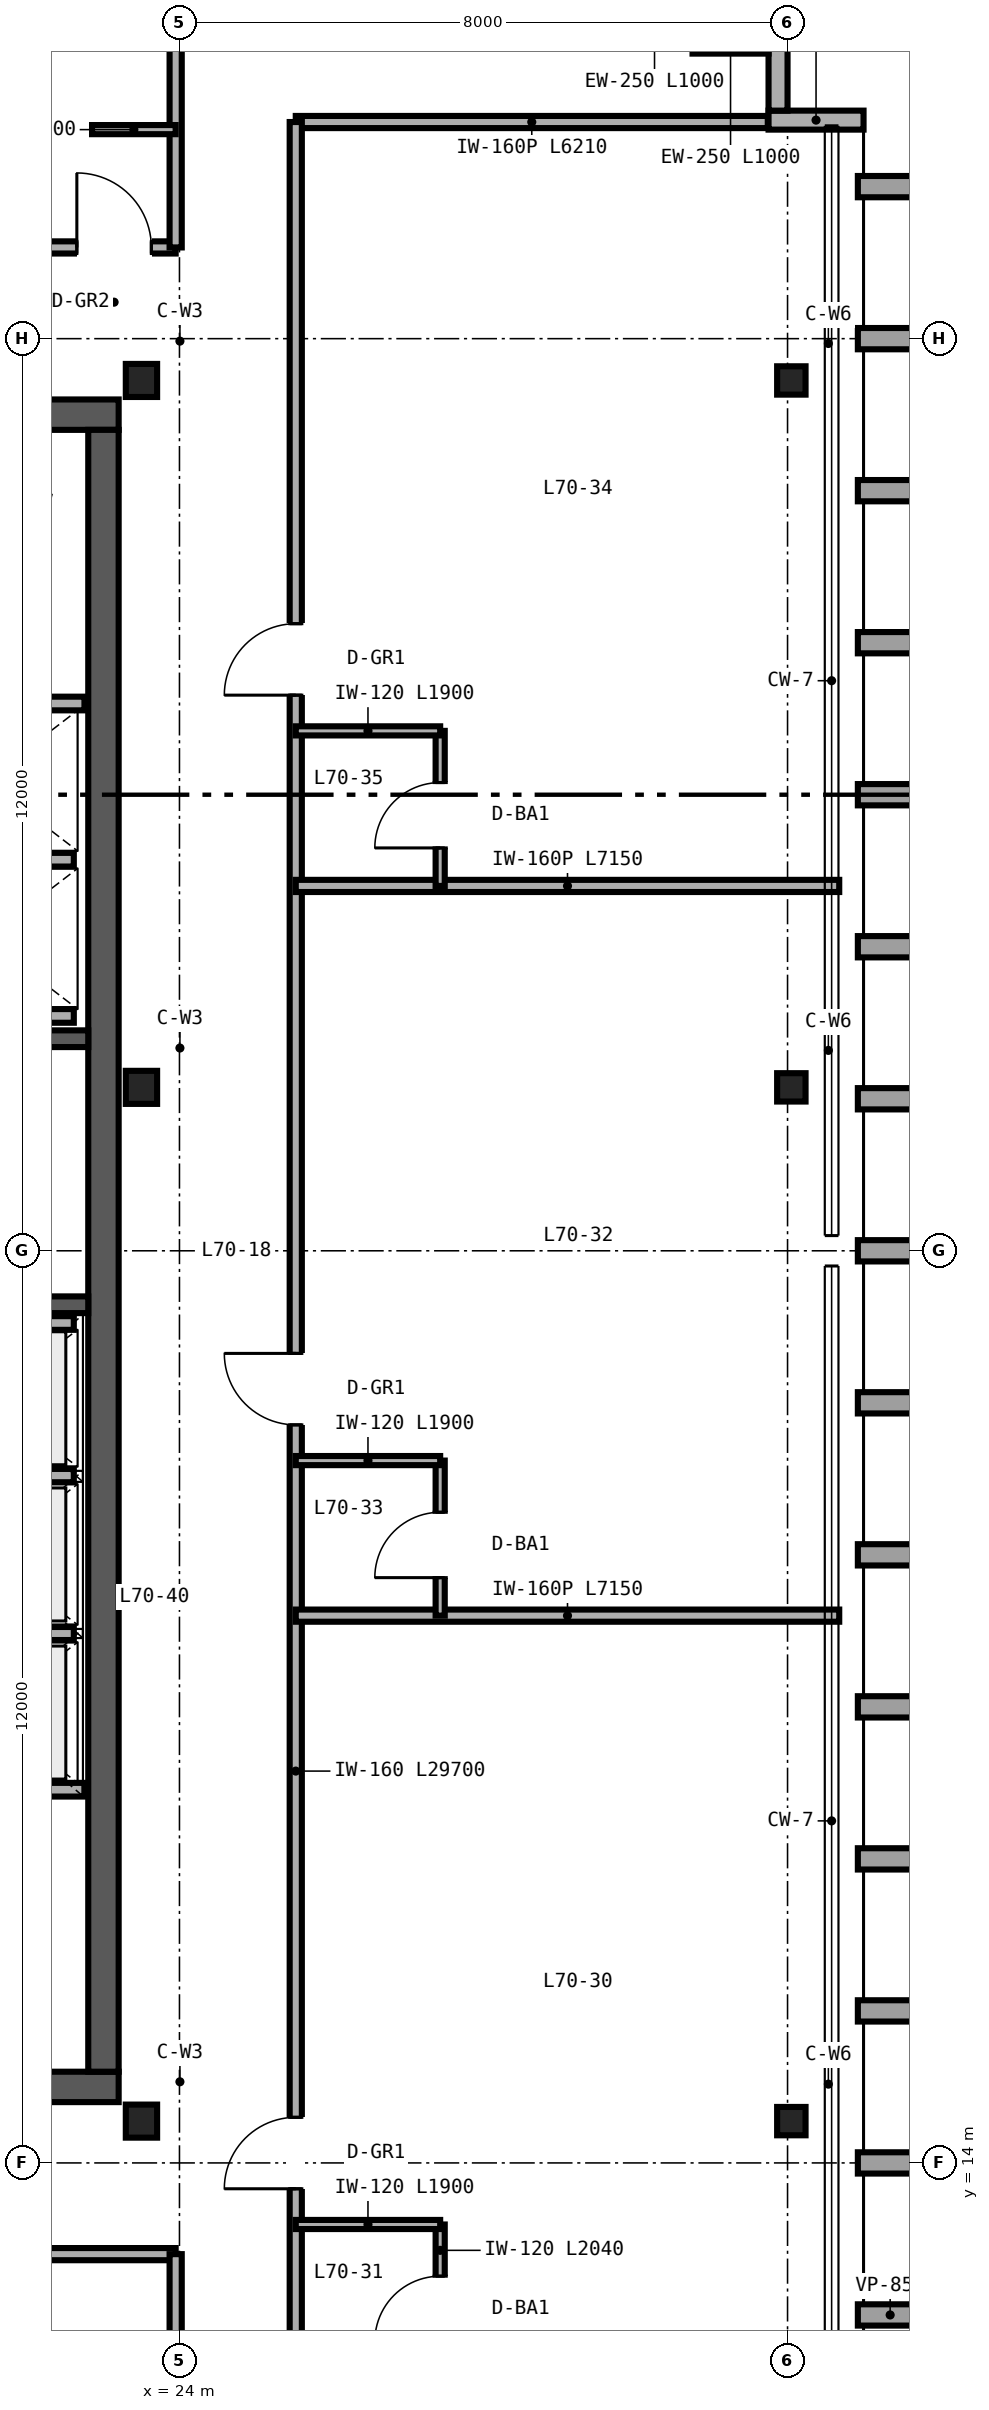
"""IFC4 building model, lengths in metres.
Left out: names, types, materials, properties, quantities, classifications, styles, units other than length and angle.
Written with IfcOpenShell. Run it as: python <this file> out.ifc"""

import sys

from ifc_helpers import new_model, si_unit, direction, frame, frame_2d, origin, origin_2d, place, context, subcontext, project, spatial, rectangle, i_section, extrude, source, transform, mapped, element, fill, save


model = new_model("IFC4")
c1 = context("Model", 3, precision=1e-05, world=origin(), true_north=direction((0.0, 1.0)))
c2 = subcontext(c1, "Body", "Model", "MODEL_VIEW")
j1 = project(units=[si_unit("LENGTHUNIT", "METRE"), si_unit("PLANEANGLEUNIT", "RADIAN")], contexts=[c1])
p1 = place(None, origin())
s1 = spatial("IfcSite", under=j1, at=p1, CompositionType="ELEMENT")
p2 = place(p1, origin())
s2 = spatial("IfcBuilding", under=s1, at=p2, CompositionType="ELEMENT")
p3 = place(p2, frame((0.0, 0.0, 276.0)))
s3 = spatial("IfcBuildingStorey", under=s2, at=p3, CompositionType="ELEMENT", Elevation=276.0)
p4 = place(p3, frame((10.8, 15.0, 0.0), z_axis=(0.0, 0.0, 1.0), x_axis=(1.0, 0.0, 0.0)))
e1 = element("IfcWall", 1, at=p4, inside=s3, PredefinedType="SHEAR", context=c2, shape_type="SweptSolid", body=[
    extrude(rectangle(XDim=12.4, YDim=0.4, at=frame_2d((6.2, 0.0))), origin(), (0.0, 0.0, 1.0), 3.38),
])
p5 = place(p4, frame((10.1, 0.0, 0.0)))
e2 = element("IfcOpeningElement", 2, at=p5, cuts=e1, PredefinedType="OPENING", context=c2, shape_type="SweptSolid", body=[
    extrude(rectangle(XDim=1.0, YDim=2.15, at=frame_2d((0.5, 1.075))), frame((0.0, 0.21, 0.0), z_axis=(0.0, -1.0, 0.0), x_axis=(1.0, 0.0, 0.0)), (0.0, 0.0, 1.0), 0.42),
])
p6 = place(p3, frame((10.8, 37.0, 0.0), z_axis=(0.0, 0.0, 1.0), x_axis=(1.0, 0.0, 0.0)))
e3 = element("IfcWall", 3, at=p6, inside=s3, PredefinedType="SHEAR", context=c2, shape_type="SweptSolid", body=[
    extrude(rectangle(XDim=12.4, YDim=0.4, at=frame_2d((6.2, 0.0))), origin(), (0.0, 0.0, 1.0), 3.38),
])
p7 = place(p6, frame((8.78, 0.0, 0.0)))
e4 = element("IfcOpeningElement", 4, at=p7, cuts=e3, PredefinedType="OPENING", context=c2, shape_type="SweptSolid", body=[
    extrude(rectangle(XDim=1.0, YDim=2.15, at=frame_2d((0.5, 1.075))), frame((0.0, 0.21, 0.0), z_axis=(0.0, -1.0, 0.0), x_axis=(1.0, 0.0, 0.0)), (0.0, 0.0, 1.0), 0.42),
])
p8 = place(p3, frame((23.0, 15.2, 0.0), z_axis=(0.0, 0.0, 1.0), x_axis=(0.0, 1.0, 0.0)))
e5 = element("IfcWall", 5, at=p8, inside=s3, PredefinedType="SHEAR", context=c2, shape_type="SweptSolid", body=[
    extrude(rectangle(XDim=21.6, YDim=0.4, at=frame_2d((10.8, 0.0))), origin(), (0.0, 0.0, 1.0), 3.38),
])
p9 = place(p3, frame((14.18, 25.29, 0.0), z_axis=(0.0, 0.0, 1.0), x_axis=(1.0, 0.0, 0.0)))
e6 = element("IfcWall", 6, at=p9, inside=s3, PredefinedType="SHEAR", context=c2, shape_type="SweptSolid", body=[
    extrude(rectangle(XDim=8.62, YDim=0.22, at=frame_2d((4.31, 0.0))), origin(), (0.0, 0.0, 1.0), 3.4),
])
p10 = place(p9, frame((0.47, 0.0, 0.0)))
e7 = element("IfcOpeningElement", 7, at=p10, cuts=e6, PredefinedType="OPENING", context=c2, shape_type="SweptSolid", body=[
    extrude(rectangle(XDim=1.05, YDim=2.15, at=frame_2d((0.525, 1.075))), frame((0.0, 0.12, 0.0), z_axis=(0.0, -1.0, 0.0), x_axis=(1.0, 0.0, 0.0)), (0.0, 0.0, 1.0), 0.24),
])
p11 = place(p3, frame((14.18, 28.79, 0.0), z_axis=(0.0, 0.0, 1.0), x_axis=(1.0, 0.0, 0.0)))
e8 = element("IfcWall", 8, at=p11, inside=s3, PredefinedType="SHEAR", context=c2, shape_type="SweptSolid", body=[
    extrude(rectangle(XDim=8.62, YDim=0.22, at=frame_2d((4.31, 0.0))), origin(), (0.0, 0.0, 1.0), 3.4),
])
m1 = source(origin(), c2, "Body", "SweptSolid", [
    extrude(i_section(OverallWidth=0.412, OverallDepth=0.435, WebThickness=0.036, FlangeThickness=0.057, FilletRadius=0.025, at=origin_2d()), origin(), (0.0, 0.0, 1.0), 3.38),
])
for number, where, z_axis, x_axis in (
    (9, (23.5, 14.55, 0.0), (0.0, 0.0, 1.0), (1.0, 0.0, 0.0)),
    (10, (23.5, 28.15, 0.0), (0.0, 0.0, 1.0), (1.0, 0.0, 0.0)),
    (11, (23.5, 37.45, 0.0), (0.0, 0.0, 1.0), (1.0, 0.0, 0.0)),
):
    element("IfcColumn", number, at=place(p3, frame(where, z_axis=z_axis, x_axis=x_axis)), inside=s3, PredefinedType="COLUMN", context=c2, shape_type="MappedRepresentation", body=[
        mapped(m1, transform((0.0, 0.0, 0.0), scale=1.0)),
    ])
m2 = source(origin(), c2, "Body", "SweptSolid", [
    extrude(i_section(OverallWidth=0.374, OverallDepth=0.373, WebThickness=0.016, FlangeThickness=0.026, FilletRadius=0.025, at=origin_2d()), origin(), (0.0, 0.0, 1.0), 3.38),
])
for number, where, z_axis, x_axis in (
    (12, (32.05, 14.55, 0.0), (0.0, 0.0, 1.0), (1.0, 0.0, 0.0)),
    (13, (32.05, 28.15, 0.0), (0.0, 0.0, 1.0), (1.0, 0.0, 0.0)),
    (14, (32.05, 37.45, 0.0), (0.0, 0.0, 1.0), (1.0, 0.0, 0.0)),
):
    element("IfcColumn", number, at=place(p3, frame(where, z_axis=z_axis, x_axis=x_axis)), inside=s3, PredefinedType="COLUMN", context=c2, shape_type="MappedRepresentation", body=[
        mapped(m2, transform((0.0, 0.0, 0.0), scale=1.0)),
    ])
p12 = place(p3, frame((33.0, 40.875, 0.0), z_axis=(0.0, 0.0, 1.0), x_axis=(-1.0, 0.0, 0.0)))
e15 = element("IfcWall", 15, at=p12, inside=s3, PredefinedType="SOLIDWALL", context=c2, shape_type="SweptSolid", body=[
    extrude(rectangle(XDim=1.25, YDim=0.25, at=frame_2d((0.625, 0.0))), origin(), (0.0, 0.0, 1.0), 3.38),
])
for number, where, z_axis, x_axis in (
    (16, (31.875, 41.0, 0.0), (0.0, 0.0, 1.0), (0.0, 1.0, 0.0)),
    (17, (31.75, 41.875, 0.0), (0.0, 0.0, 1.0), (-1.0, 0.0, 0.0)),
):
    element("IfcWall", number, at=place(p3, frame(where, z_axis=z_axis, x_axis=x_axis)), inside=s3, PredefinedType="SOLIDWALL", context=c2, shape_type="SweptSolid", body=[
        extrude(rectangle(XDim=1.0, YDim=0.25, at=frame_2d((0.5, 0.0))), origin(), (0.0, 0.0, 1.0), 3.38),
    ])
p13 = place(p3, frame((20.12, 18.91, 0.0), z_axis=(0.0, 0.0, 1.0), x_axis=(1.0, 0.0, 0.0)))
e18 = element("IfcWall", 18, at=p13, inside=s3, PredefinedType="SOLIDWALL", context=c2, shape_type="SweptSolid", body=[
    extrude(rectangle(XDim=2.63, YDim=0.18, at=frame_2d((1.315, 0.0))), origin(), (0.0, 0.0, 1.0), 3.38),
])
p14 = place(p3, frame((20.25, 25.05, 0.0), z_axis=(0.0, 0.0, 1.0), x_axis=(1.0, 0.0, 0.0)))
e19 = element("IfcWall", 19, at=p14, inside=s3, PredefinedType="SOLIDWALL", context=c2, shape_type="SweptSolid", body=[
    extrude(rectangle(XDim=2.36, YDim=0.18, at=frame_2d((1.18, 0.0))), origin(), (0.0, 0.0, 1.0), 3.38),
])
p15 = place(p3, frame((20.25, 20.965, 0.0), z_axis=(0.0, 0.0, 1.0), x_axis=(1.0, 0.0, 0.0)))
e20 = element("IfcWall", 20, at=p15, inside=s3, PredefinedType="SOLIDWALL", context=c2, shape_type="SweptSolid", body=[
    extrude(rectangle(XDim=2.36, YDim=0.18, at=frame_2d((1.18, 0.0))), origin(), (0.0, 0.0, 1.0), 2.48),
])
for number, where, z_axis, x_axis in (
    (21, (20.25, 23.045, 0.0), (0.0, 0.0, 1.0), (1.0, 0.0, 0.0)),
    (22, (20.25, 29.09, 0.0), (0.0, 0.0, 1.0), (1.0, 0.0, 0.0)),
):
    element("IfcWall", number, at=place(p3, frame(where, z_axis=z_axis, x_axis=x_axis)), inside=s3, PredefinedType="SOLIDWALL", context=c2, shape_type="SweptSolid", body=[
        extrude(rectangle(XDim=2.36, YDim=0.18, at=frame_2d((1.18, 0.0))), origin(), (0.0, 0.0, 1.0), 3.38),
    ])
p16 = place(p3, frame((20.25, 33.2, 0.0), z_axis=(0.0, 0.0, 1.0), x_axis=(1.0, 0.0, 0.0)))
e23 = element("IfcWall", 23, at=p16, inside=s3, PredefinedType="SOLIDWALL", context=c2, shape_type="SweptSolid", body=[
    extrude(rectangle(XDim=2.5, YDim=0.18, at=frame_2d((1.25, 0.0))), origin(), (0.0, 0.0, 1.0), 3.38),
])
p17 = place(p3, frame((20.25, 31.145, 0.0), z_axis=(0.0, 0.0, 1.0), x_axis=(1.0, 0.0, 0.0)))
e24 = element("IfcWall", 24, at=p17, inside=s3, PredefinedType="SOLIDWALL", context=c2, shape_type="SweptSolid", body=[
    extrude(rectangle(XDim=2.36, YDim=0.18, at=frame_2d((1.18, 0.0))), origin(), (0.0, 0.0, 1.0), 3.38),
])
p18 = place(p3, frame((11.2, 12.8, 0.0), z_axis=(0.0, 0.0, 1.0), x_axis=(1.0, 0.0, 0.0)))
e25 = element("IfcWall", 25, at=p18, inside=s3, PredefinedType="PARTITIONING", context=c2, shape_type="SweptSolid", body=[
    extrude(rectangle(XDim=12.75, YDim=0.16, at=frame_2d((6.375, 0.0))), origin(), (0.0, 0.0, 1.0), 3.38),
])
p19 = place(p18, frame((5.7, 0.0, 0.0)))
e26 = element("IfcOpeningElement", 26, at=p19, cuts=e25, PredefinedType="OPENING", context=c2, shape_type="SweptSolid", body=[
    extrude(rectangle(XDim=0.98, YDim=2.2, at=frame_2d((0.49, 1.1))), frame((0.0, 0.09, 0.0), z_axis=(0.0, -1.0, 0.0), x_axis=(1.0, 0.0, 0.0)), (0.0, 0.0, 1.0), 0.18),
])
p20 = place(p18, frame((9.395, 0.0, 0.0)))
e27 = element("IfcOpeningElement", 27, at=p20, cuts=e25, PredefinedType="OPENING", context=c2, shape_type="SweptSolid", body=[
    extrude(rectangle(XDim=0.96, YDim=2.15, at=frame_2d((0.48, 1.075))), frame((0.0, 0.09, 0.0), z_axis=(0.0, -1.0, 0.0), x_axis=(1.0, 0.0, 0.0)), (0.0, 0.0, 1.0), 0.18),
])
p21 = place(p3, frame((23.95, 8.36, 0.0), z_axis=(0.0, 0.0, 1.0), x_axis=(0.0, 1.0, 0.0)))
e28 = element("IfcWall", 28, at=p21, inside=s3, PredefinedType="PARTITIONING", context=c2, shape_type="SweptSolid", body=[
    extrude(rectangle(XDim=4.44, YDim=0.16, at=frame_2d((2.22, 0.0))), origin(), (0.0, 0.0, 1.0), 3.38),
])
p22 = place(p3, frame((11.2, 39.2, 0.0), z_axis=(0.0, 0.0, 1.0), x_axis=(1.0, 0.0, 0.0)))
e29 = element("IfcWall", 29, at=p22, inside=s3, PredefinedType="PARTITIONING", context=c2, shape_type="SweptSolid", body=[
    extrude(rectangle(XDim=12.75, YDim=0.16, at=frame_2d((6.375, 0.0))), origin(), (0.0, 0.0, 1.0), 3.38),
])
p23 = place(p22, frame((11.45, 0.0, 0.0)))
e30 = element("IfcOpeningElement", 30, at=p23, cuts=e29, PredefinedType="OPENING", context=c2, shape_type="SweptSolid", body=[
    extrude(rectangle(XDim=0.98, YDim=2.2, at=frame_2d((0.49, 1.1))), frame((0.0, 0.09, 0.0), z_axis=(0.0, -1.0, 0.0), x_axis=(1.0, 0.0, 0.0)), (0.0, 0.0, 1.0), 0.18),
])
p24 = place(p3, frame((23.95, 39.2, 0.0), z_axis=(0.0, 0.0, 1.0), x_axis=(0.0, 1.0, 0.0)))
e31 = element("IfcWall", 31, at=p24, inside=s3, PredefinedType="PARTITIONING", context=c2, shape_type="SweptSolid", body=[
    extrude(rectangle(XDim=4.44, YDim=0.16, at=frame_2d((2.22, 0.0))), origin(), (0.0, 0.0, 1.0), 3.38),
])
p25 = place(p3, frame((22.85, 40.75, 0.0), z_axis=(0.0, 0.0, 1.0), x_axis=(1.0, 0.0, 0.0)))
e32 = element("IfcWall", 32, at=p25, inside=s3, PredefinedType="PARTITIONING", context=c2, shape_type="SweptSolid", body=[
    extrude(rectangle(XDim=1.1, YDim=0.12, at=frame_2d((0.55, 0.0))), origin(), (0.0, 0.0, 1.0), 3.38),
])
p26 = place(p3, frame((25.53, 40.85, 0.0), z_axis=(0.0, 0.0, 1.0), x_axis=(1.0, 0.0, 0.0)))
e33 = element("IfcWall", 33, at=p26, inside=s3, PredefinedType="PARTITIONING", context=c2, shape_type="SweptSolid", body=[
    extrude(rectangle(XDim=6.21, YDim=0.16, at=frame_2d((3.105, 0.0))), origin(), (0.0, 0.0, 1.0), 3.38),
])
p27 = place(p3, frame((25.53, 11.15, 0.0), z_axis=(0.0, 0.0, 1.0), x_axis=(0.0, 1.0, 0.0)))
e34 = element("IfcWall", 34, at=p27, inside=s3, PredefinedType="PARTITIONING", context=c2, shape_type="SweptSolid", body=[
    extrude(rectangle(XDim=29.7, YDim=0.16, at=frame_2d((14.85, 0.0))), origin(), (0.0, 0.0, 1.0), 2.524),
])
p28 = place(p27, frame((2.51, 0.0, 0.0)))
e35 = element("IfcOpeningElement", 35, at=p28, cuts=e34, PredefinedType="OPENING", context=c2, shape_type="SweptSolid", body=[
    extrude(rectangle(XDim=0.94, YDim=2.15, at=frame_2d((0.47, 1.075))), frame((0.0, 0.09, 0.0), z_axis=(0.0, -1.0, 0.0), x_axis=(1.0, 0.0, 0.0)), (0.0, 0.0, 1.0), 0.18),
])
p29 = place(p27, frame((12.56, 0.0, 0.0)))
e36 = element("IfcOpeningElement", 36, at=p29, cuts=e34, PredefinedType="OPENING", context=c2, shape_type="SweptSolid", body=[
    extrude(rectangle(XDim=0.94, YDim=2.15, at=frame_2d((0.47, 1.075))), frame((0.0, 0.09, 0.0), z_axis=(0.0, -1.0, 0.0), x_axis=(1.0, 0.0, 0.0)), (0.0, 0.0, 1.0), 0.18),
])
p30 = place(p27, frame((22.16, 0.0, 0.0)))
e37 = element("IfcOpeningElement", 37, at=p30, cuts=e34, PredefinedType="OPENING", context=c2, shape_type="SweptSolid", body=[
    extrude(rectangle(XDim=0.94, YDim=2.15, at=frame_2d((0.47, 1.075))), frame((0.0, 0.09, 0.0), z_axis=(0.0, -1.0, 0.0), x_axis=(1.0, 0.0, 0.0)), (0.0, 0.0, 1.0), 0.18),
])
p31 = place(p3, frame((25.53, 21.2, 0.0), z_axis=(0.0, 0.0, 1.0), x_axis=(1.0, 0.0, 0.0)))
e38 = element("IfcWall", 38, at=p31, inside=s3, PredefinedType="PARTITIONING", context=c2, shape_type="SweptSolid", body=[
    extrude(rectangle(XDim=7.15, YDim=0.16, at=frame_2d((3.575, 0.0))), origin(), (0.0, 0.0, 1.0), 2.601),
])
p32 = place(p3, frame((27.43, 11.15, 0.0), z_axis=(0.0, 0.0, 1.0), x_axis=(0.0, 1.0, 0.0)))
e39 = element("IfcWall", 39, at=p32, inside=s3, PredefinedType="PARTITIONING", context=c2, shape_type="SweptSolid", body=[
    extrude(rectangle(XDim=2.04, YDim=0.12, at=frame_2d((1.02, 0.0))), origin(), (0.0, 0.0, 1.0), 3.38),
])
p33 = place(p32, frame((0.5, 0.0, 0.0)))
e40 = element("IfcOpeningElement", 40, at=p33, cuts=e39, PredefinedType="OPENING", context=c2, shape_type="SweptSolid", body=[
    extrude(rectangle(XDim=0.86, YDim=2.1, at=frame_2d((0.43, 1.05))), frame((0.0, 0.07, 0.0), z_axis=(0.0, -1.0, 0.0), x_axis=(1.0, 0.0, 0.0)), (0.0, 0.0, 1.0), 0.14),
])
p34 = place(p3, frame((25.53, 13.19, 0.0), z_axis=(0.0, 0.0, 1.0), x_axis=(1.0, 0.0, 0.0)))
e41 = element("IfcWall", 41, at=p34, inside=s3, PredefinedType="PARTITIONING", context=c2, shape_type="SweptSolid", body=[
    extrude(rectangle(XDim=1.9, YDim=0.12, at=frame_2d((0.95, 0.0))), origin(), (0.0, 0.0, 1.0), 3.38),
])
p35 = place(p3, frame((25.53, 30.8, 0.0), z_axis=(0.0, 0.0, 1.0), x_axis=(1.0, 0.0, 0.0)))
e42 = element("IfcWall", 42, at=p35, inside=s3, PredefinedType="PARTITIONING", context=c2, shape_type="SweptSolid", body=[
    extrude(rectangle(XDim=7.15, YDim=0.16, at=frame_2d((3.575, 0.0))), origin(), (0.0, 0.0, 1.0), 2.763),
])
p36 = place(p3, frame((27.43, 21.2, 0.0), z_axis=(0.0, 0.0, 1.0), x_axis=(0.0, 1.0, 0.0)))
e43 = element("IfcWall", 43, at=p36, inside=s3, PredefinedType="PARTITIONING", context=c2, shape_type="SweptSolid", body=[
    extrude(rectangle(XDim=2.04, YDim=0.12, at=frame_2d((1.02, 0.0))), origin(), (0.0, 0.0, 1.0), 3.38),
])
p37 = place(p36, frame((0.5, 0.0, 0.0)))
e44 = element("IfcOpeningElement", 44, at=p37, cuts=e43, PredefinedType="OPENING", context=c2, shape_type="SweptSolid", body=[
    extrude(rectangle(XDim=0.86, YDim=2.1, at=frame_2d((0.43, 1.05))), frame((0.0, 0.07, 0.0), z_axis=(0.0, -1.0, 0.0), x_axis=(1.0, 0.0, 0.0)), (0.0, 0.0, 1.0), 0.14),
])
p38 = place(p3, frame((25.53, 23.24, 0.0), z_axis=(0.0, 0.0, 1.0), x_axis=(1.0, 0.0, 0.0)))
e45 = element("IfcWall", 45, at=p38, inside=s3, PredefinedType="PARTITIONING", context=c2, shape_type="SweptSolid", body=[
    extrude(rectangle(XDim=1.9, YDim=0.12, at=frame_2d((0.95, 0.0))), origin(), (0.0, 0.0, 1.0), 3.38),
])
p39 = place(p3, frame((27.43, 30.8, 0.0), z_axis=(0.0, 0.0, 1.0), x_axis=(0.0, 1.0, 0.0)))
e46 = element("IfcWall", 46, at=p39, inside=s3, PredefinedType="PARTITIONING", context=c2, shape_type="SweptSolid", body=[
    extrude(rectangle(XDim=2.04, YDim=0.12, at=frame_2d((1.02, 0.0))), origin(), (0.0, 0.0, 1.0), 3.38),
])
p40 = place(p39, frame((0.5, 0.0, 0.0)))
e47 = element("IfcOpeningElement", 47, at=p40, cuts=e46, PredefinedType="OPENING", context=c2, shape_type="SweptSolid", body=[
    extrude(rectangle(XDim=0.86, YDim=2.1, at=frame_2d((0.43, 1.05))), frame((0.0, 0.07, 0.0), z_axis=(0.0, -1.0, 0.0), x_axis=(1.0, 0.0, 0.0)), (0.0, 0.0, 1.0), 0.14),
])
p41 = place(p3, frame((25.53, 32.84, 0.0), z_axis=(0.0, 0.0, 1.0), x_axis=(1.0, 0.0, 0.0)))
e48 = element("IfcWall", 48, at=p41, inside=s3, PredefinedType="PARTITIONING", context=c2, shape_type="SweptSolid", body=[
    extrude(rectangle(XDim=1.9, YDim=0.12, at=frame_2d((0.95, 0.0))), origin(), (0.0, 0.0, 1.0), 3.38),
])
m3 = source(origin(), c2, "Body", "SweptSolid", [
    extrude(rectangle(XDim=0.98, YDim=2.2, at=frame_2d((0.49, 1.1))), frame((0.0, 0.025, 0.0), z_axis=(0.0, -1.0, 0.0), x_axis=(1.0, 0.0, 0.0)), (0.0, 0.0, 1.0), 0.05),
])
p42 = place(p23, origin())
e49 = element("IfcDoor", 49, at=p42, inside=s3, OperationType="SINGLE_SWING_LEFT", PredefinedType="DOOR", context=c2, shape_type="MappedRepresentation", body=[
    mapped(m3, transform((0.0, 0.0, 0.0), scale=1.0)),
])
fill(e30, e49)
m4 = source(origin(), c2, "Body", "SweptSolid", [
    extrude(rectangle(XDim=0.86, YDim=2.1, at=frame_2d((0.43, 1.05))), frame((0.0, 0.025, 0.0), z_axis=(0.0, -1.0, 0.0), x_axis=(1.0, 0.0, 0.0)), (0.0, 0.0, 1.0), 0.05),
])
p43 = place(p33, origin())
e50 = element("IfcDoor", 50, at=p43, inside=s3, OperationType="SINGLE_SWING_LEFT", PredefinedType="DOOR", context=c2, shape_type="MappedRepresentation", body=[
    mapped(m4, transform((0.0, 0.0, 0.0), scale=1.0)),
])
fill(e40, e50)
m5 = source(origin(), c2, "Body", "SweptSolid", [
    extrude(rectangle(XDim=0.94, YDim=2.15, at=frame_2d((0.47, 1.075))), frame((0.0, 0.025, 0.0), z_axis=(0.0, -1.0, 0.0), x_axis=(1.0, 0.0, 0.0)), (0.0, 0.0, 1.0), 0.05),
])
p44 = place(p28, origin())
e51 = element("IfcDoor", 51, at=p44, inside=s3, OperationType="SINGLE_SWING_LEFT", PredefinedType="DOOR", context=c2, shape_type="MappedRepresentation", body=[
    mapped(m5, transform((0.0, 0.0, 0.0), scale=1.0)),
])
fill(e35, e51)
p45 = place(p37, origin())
e52 = element("IfcDoor", 52, at=p45, inside=s3, OperationType="SINGLE_SWING_LEFT", PredefinedType="DOOR", context=c2, shape_type="MappedRepresentation", body=[
    mapped(m4, transform((0.0, 0.0, 0.0), scale=1.0)),
])
fill(e44, e52)
p46 = place(p29, origin())
e53 = element("IfcDoor", 53, at=p46, inside=s3, OperationType="SINGLE_SWING_RIGHT", PredefinedType="DOOR", context=c2, shape_type="MappedRepresentation", body=[
    mapped(m5, transform((0.0, 0.0, 0.0), scale=1.0)),
])
fill(e36, e53)
p47 = place(p40, origin())
e54 = element("IfcDoor", 54, at=p47, inside=s3, OperationType="SINGLE_SWING_LEFT", PredefinedType="DOOR", context=c2, shape_type="MappedRepresentation", body=[
    mapped(m4, transform((0.0, 0.0, 0.0), scale=1.0)),
])
fill(e47, e54)
p48 = place(p30, origin())
e55 = element("IfcDoor", 55, at=p48, inside=s3, OperationType="SINGLE_SWING_LEFT", PredefinedType="DOOR", context=c2, shape_type="MappedRepresentation", body=[
    mapped(m5, transform((0.0, 0.0, 0.0), scale=1.0)),
])
fill(e37, e55)
save(model, sys.argv[1])
